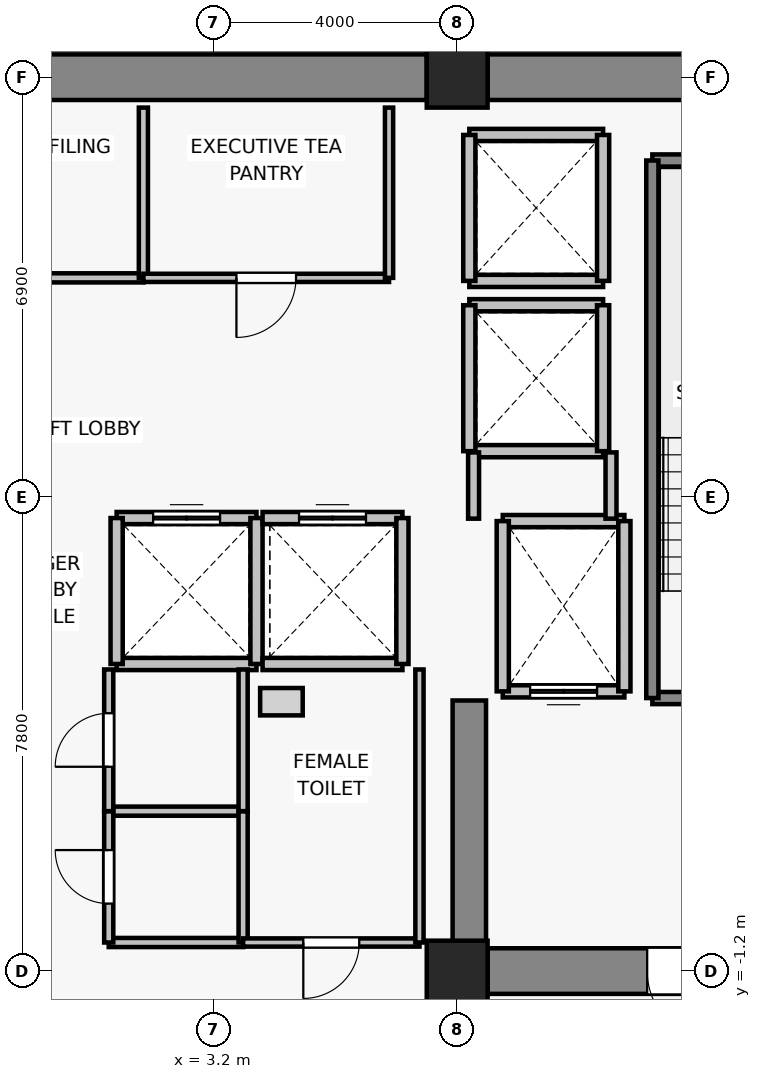
"""IFC4 building model, lengths in metres.
Left out: names, types, materials, properties, quantities, classifications, styles, units other than length and angle.
Written with IfcOpenShell. Run it as: python <this file> out.ifc"""

import sys

from ifc_helpers import new_model, si_unit, direction, frame, frame_2d, origin, origin_2d, place, context, subcontext, project, spatial, rectangle, extrude, source, transform, mapped, element, fill, save


model = new_model("IFC4")
c1 = context("Model", 3, precision=1e-05, world=origin(), true_north=direction((0.0, 1.0)))
c2 = subcontext(c1, "Body", "Model", "MODEL_VIEW")
j1 = project(units=[si_unit("LENGTHUNIT", "METRE"), si_unit("PLANEANGLEUNIT", "RADIAN")], contexts=[c1])
p1 = place(None, origin())
s1 = spatial("IfcSite", under=j1, at=p1, CompositionType="ELEMENT")
p2 = place(p1, origin())
s2 = spatial("IfcBuilding", under=s1, at=p2, CompositionType="ELEMENT")
p3 = place(p2, frame((0.0, 0.0, 179.2)))
s3 = spatial("IfcBuildingStorey", under=s2, at=p3, CompositionType="ELEMENT", Elevation=179.2)
for number, where, z_axis, x_axis in (
    (1, (7.2, -1.2, 0.0), (0.0, 0.0, 1.0), (1.0, 0.0, 0.0)),
    (2, (7.2, 13.5, 0.0), (0.0, 0.0, 1.0), (1.0, 0.0, 0.0)),
):
    element("IfcColumn", number, at=place(p3, frame(where, z_axis=z_axis, x_axis=x_axis)), inside=s3, PredefinedType="COLUMN", context=c2, shape_type="SweptSolid", body=[
        extrude(rectangle(XDim=1.0, YDim=1.0, at=origin_2d()), origin(), (0.0, 0.0, 1.0), 3.3),
    ])
p4 = place(p3, frame((-6.7, 13.5, 0.0), z_axis=(0.0, 0.0, 1.0), x_axis=(1.0, 0.0, 0.0)))
e3 = element("IfcWall", 3, at=p4, inside=s3, PredefinedType="SHEAR", context=c2, shape_type="SweptSolid", body=[
    extrude(rectangle(XDim=13.4, YDim=0.75, at=frame_2d((6.7, 0.0))), origin(), (0.0, 0.0, 1.0), 3.075),
])
p5 = place(p3, frame((7.7, 13.5, 0.0), z_axis=(0.0, 0.0, 1.0), x_axis=(1.0, 0.0, 0.0)))
e4 = element("IfcWall", 4, at=p5, inside=s3, PredefinedType="SHEAR", context=c2, shape_type="SweptSolid", body=[
    extrude(rectangle(XDim=6.2, YDim=0.75, at=frame_2d((3.1, 0.0))), origin(), (0.0, 0.0, 1.0), 3.075),
])
p6 = place(p3, frame((13.9, -1.2, 0.0), z_axis=(0.0, 0.0, 1.0), x_axis=(-1.0, 0.0, 0.0)))
e5 = element("IfcWall", 5, at=p6, inside=s3, PredefinedType="SHEAR", context=c2, shape_type="SweptSolid", body=[
    extrude(rectangle(XDim=6.2, YDim=0.75, at=frame_2d((3.1, 0.0))), origin(), (0.0, 0.0, 1.0), 3.075),
])
p7 = place(p6, frame((2.425, 0.0, 0.0)))
e6 = element("IfcOpeningElement", 6, at=p7, cuts=e5, PredefinedType="OPENING", context=c2, shape_type="SweptSolid", body=[
    extrude(rectangle(XDim=1.15, YDim=2.15, at=frame_2d((0.575, 1.075))), frame((0.0, 0.385, 0.0), z_axis=(0.0, -1.0, 0.0), x_axis=(1.0, 0.0, 0.0)), (0.0, 0.0, 1.0), 0.77),
])
p8 = place(p3, frame((7.4, -0.825, 0.0), z_axis=(0.0, 0.0, 1.0), x_axis=(0.0, 1.0, 0.0)))
e7 = element("IfcWall", 7, at=p8, inside=s3, PredefinedType="SHEAR", context=c2, shape_type="SweptSolid", body=[
    extrude(rectangle(XDim=4.075, YDim=0.55, at=frame_2d((2.038, 0.0))), origin(), (0.0, 0.0, 1.0), 3.075),
])
p9 = place(p3, frame((9.95, 3.4, 0.0), z_axis=(0.0, 0.0, 1.0), x_axis=(-1.0, 0.0, 0.0)))
e8 = element("IfcWall", 8, at=p9, inside=s3, PredefinedType="SOLIDWALL", context=c2, shape_type="SweptSolid", body=[
    extrude(rectangle(XDim=2.0, YDim=0.2, at=frame_2d((1.0, 0.0))), origin(), (0.0, 0.0, 1.0), 3.075),
])
p10 = place(p9, frame((0.45, 0.0, 0.0)))
e9 = element("IfcOpeningElement", 9, at=p10, cuts=e8, PredefinedType="OPENING", context=c2, shape_type="SweptSolid", body=[
    extrude(rectangle(XDim=1.1, YDim=2.2, at=frame_2d((0.55, 1.1))), frame((0.0, 0.11, 0.0), z_axis=(0.0, -1.0, 0.0), x_axis=(1.0, 0.0, 0.0)), (0.0, 0.0, 1.0), 0.22),
])
p11 = place(p3, frame((7.95, 6.2, 0.0), z_axis=(0.0, 0.0, 1.0), x_axis=(1.0, 0.0, 0.0)))
e10 = element("IfcWall", 10, at=p11, inside=s3, PredefinedType="SOLIDWALL", context=c2, shape_type="SweptSolid", body=[
    extrude(rectangle(XDim=2.0, YDim=0.2, at=frame_2d((1.0, 0.0))), origin(), (0.0, 0.0, 1.0), 3.075),
])
for number, where, z_axis, x_axis in (
    (11, (7.95, 3.4, 0.0), (0.0, 0.0, 1.0), (0.0, 1.0, 0.0)),
    (12, (9.95, 6.2, 0.0), (0.0, 0.0, 1.0), (0.0, -1.0, 0.0)),
):
    element("IfcWall", number, at=place(p3, frame(where, z_axis=z_axis, x_axis=x_axis)), inside=s3, PredefinedType="SOLIDWALL", context=c2, shape_type="SweptSolid", body=[
        extrude(rectangle(XDim=2.8, YDim=0.2, at=frame_2d((1.4, 0.0))), origin(), (0.0, 0.0, 1.0), 3.075),
    ])
p12 = place(p3, frame((3.9, 3.85, 0.0), z_axis=(0.0, 0.0, 1.0), x_axis=(-1.0, 0.0, 0.0)))
e13 = element("IfcWall", 13, at=p12, inside=s3, PredefinedType="SOLIDWALL", context=c2, shape_type="SweptSolid", body=[
    extrude(rectangle(XDim=2.3, YDim=0.2, at=frame_2d((1.15, 0.0))), origin(), (0.0, 0.0, 1.0), 3.075),
])
p13 = place(p3, frame((1.6, 6.25, 0.0), z_axis=(0.0, 0.0, 1.0), x_axis=(1.0, 0.0, 0.0)))
e14 = element("IfcWall", 14, at=p13, inside=s3, PredefinedType="SOLIDWALL", context=c2, shape_type="SweptSolid", body=[
    extrude(rectangle(XDim=2.3, YDim=0.2, at=frame_2d((1.15, 0.0))), origin(), (0.0, 0.0, 1.0), 3.075),
])
p14 = place(p13, frame((0.6, 0.0, 0.0)))
e15 = element("IfcOpeningElement", 15, at=p14, cuts=e14, PredefinedType="OPENING", context=c2, shape_type="SweptSolid", body=[
    extrude(rectangle(XDim=1.1, YDim=2.2, at=frame_2d((0.55, 1.1))), frame((0.0, 0.11, 0.0), z_axis=(0.0, -1.0, 0.0), x_axis=(1.0, 0.0, 0.0)), (0.0, 0.0, 1.0), 0.22),
])
for number, where, z_axis, x_axis in (
    (16, (1.6, 3.85, 0.0), (0.0, 0.0, 1.0), (0.0, 1.0, 0.0)),
    (17, (3.9, 6.25, 0.0), (0.0, 0.0, 1.0), (0.0, -1.0, 0.0)),
):
    element("IfcWall", number, at=place(p3, frame(where, z_axis=z_axis, x_axis=x_axis)), inside=s3, PredefinedType="SOLIDWALL", context=c2, shape_type="SweptSolid", body=[
        extrude(rectangle(XDim=2.4, YDim=0.2, at=frame_2d((1.2, 0.0))), origin(), (0.0, 0.0, 1.0), 3.075),
    ])
p15 = place(p3, frame((6.3, 3.85, 0.0), z_axis=(0.0, 0.0, 1.0), x_axis=(-1.0, 0.0, 0.0)))
e18 = element("IfcWall", 18, at=p15, inside=s3, PredefinedType="SOLIDWALL", context=c2, shape_type="SweptSolid", body=[
    extrude(rectangle(XDim=2.3, YDim=0.2, at=frame_2d((1.15, 0.0))), origin(), (0.0, 0.0, 1.0), 3.075),
])
p16 = place(p3, frame((4.0, 6.25, 0.0), z_axis=(0.0, 0.0, 1.0), x_axis=(1.0, 0.0, 0.0)))
e19 = element("IfcWall", 19, at=p16, inside=s3, PredefinedType="SOLIDWALL", context=c2, shape_type="SweptSolid", body=[
    extrude(rectangle(XDim=2.3, YDim=0.2, at=frame_2d((1.15, 0.0))), origin(), (0.0, 0.0, 1.0), 3.075),
])
p17 = place(p16, frame((0.6, 0.0, 0.0)))
e20 = element("IfcOpeningElement", 20, at=p17, cuts=e19, PredefinedType="OPENING", context=c2, shape_type="SweptSolid", body=[
    extrude(rectangle(XDim=1.1, YDim=2.2, at=frame_2d((0.55, 1.1))), frame((0.0, 0.11, 0.0), z_axis=(0.0, -1.0, 0.0), x_axis=(1.0, 0.0, 0.0)), (0.0, 0.0, 1.0), 0.22),
])
p18 = place(p3, frame((6.3, 6.25, 0.0), z_axis=(0.0, 0.0, 1.0), x_axis=(0.0, -1.0, 0.0)))
e21 = element("IfcWall", 21, at=p18, inside=s3, PredefinedType="SOLIDWALL", context=c2, shape_type="SweptSolid", body=[
    extrude(rectangle(XDim=2.4, YDim=0.2, at=frame_2d((1.2, 0.0))), origin(), (0.0, 0.0, 1.0), 3.075),
])
for number, where, z_axis, x_axis in (
    (22, (9.6, 7.35, 0.0), (0.0, 0.0, 1.0), (-1.0, 0.0, 0.0)),
    (23, (7.4, 9.75, 0.0), (0.0, 0.0, 1.0), (1.0, 0.0, 0.0)),
):
    element("IfcWall", number, at=place(p3, frame(where, z_axis=z_axis, x_axis=x_axis)), inside=s3, PredefinedType="SOLIDWALL", context=c2, shape_type="SweptSolid", body=[
        extrude(rectangle(XDim=2.2, YDim=0.2, at=frame_2d((1.1, 0.0))), origin(), (0.0, 0.0, 1.0), 2.565),
    ])
p19 = place(p3, frame((7.4, 7.35, 0.0), z_axis=(0.0, 0.0, 1.0), x_axis=(0.0, 1.0, 0.0)))
e24 = element("IfcWall", 24, at=p19, inside=s3, PredefinedType="SOLIDWALL", context=c2, shape_type="SweptSolid", body=[
    extrude(rectangle(XDim=2.4, YDim=0.2, at=frame_2d((1.2, 0.0))), origin(), (0.0, 0.0, 1.0), 2.565),
])
p20 = place(p3, frame((9.6, 9.75, 0.0), z_axis=(0.0, 0.0, 1.0), x_axis=(0.0, -1.0, 0.0)))
e25 = element("IfcWall", 25, at=p20, inside=s3, PredefinedType="SOLIDWALL", context=c2, shape_type="SweptSolid", body=[
    extrude(rectangle(XDim=2.4, YDim=0.2, at=frame_2d((1.2, 0.0))), origin(), (0.0, 0.0, 1.0), 3.075),
])
for number, where, z_axis, x_axis in (
    (26, (9.6, 10.15, 0.0), (0.0, 0.0, 1.0), (-1.0, 0.0, 0.0)),
    (27, (7.4, 12.55, 0.0), (0.0, 0.0, 1.0), (1.0, 0.0, 0.0)),
):
    element("IfcWall", number, at=place(p3, frame(where, z_axis=z_axis, x_axis=x_axis)), inside=s3, PredefinedType="SOLIDWALL", context=c2, shape_type="SweptSolid", body=[
        extrude(rectangle(XDim=2.2, YDim=0.2, at=frame_2d((1.1, 0.0))), origin(), (0.0, 0.0, 1.0), 2.565),
    ])
p21 = place(p3, frame((7.4, 10.15, 0.0), z_axis=(0.0, 0.0, 1.0), x_axis=(0.0, 1.0, 0.0)))
e28 = element("IfcWall", 28, at=p21, inside=s3, PredefinedType="SOLIDWALL", context=c2, shape_type="SweptSolid", body=[
    extrude(rectangle(XDim=2.4, YDim=0.2, at=frame_2d((1.2, 0.0))), origin(), (0.0, 0.0, 1.0), 2.565),
])
p22 = place(p3, frame((9.6, 12.55, 0.0), z_axis=(0.0, 0.0, 1.0), x_axis=(0.0, -1.0, 0.0)))
e29 = element("IfcWall", 29, at=p22, inside=s3, PredefinedType="SOLIDWALL", context=c2, shape_type="SweptSolid", body=[
    extrude(rectangle(XDim=2.4, YDim=0.2, at=frame_2d((1.2, 0.0))), origin(), (0.0, 0.0, 1.0), 3.075),
])
p23 = place(p3, frame((13.93, 3.29, 0.0), z_axis=(0.0, 0.0, 1.0), x_axis=(-1.0, 0.0, 0.0)))
e30 = element("IfcWall", 30, at=p23, inside=s3, PredefinedType="SOLIDWALL", context=c2, shape_type="SweptSolid", body=[
    extrude(rectangle(XDim=3.52, YDim=0.2, at=frame_2d((1.76, 0.0))), origin(), (0.0, 0.0, 1.0), 3.075),
])
p24 = place(p23, frame((1.205, 0.0, 0.0)))
e31 = element("IfcOpeningElement", 31, at=p24, cuts=e30, PredefinedType="OPENING", context=c2, shape_type="SweptSolid", body=[
    extrude(rectangle(XDim=1.15, YDim=2.15, at=frame_2d((0.575, 1.075))), frame((0.0, 0.11, 0.0), z_axis=(0.0, -1.0, 0.0), x_axis=(1.0, 0.0, 0.0)), (0.0, 0.0, 1.0), 0.22),
])
p25 = place(p3, frame((10.41, 12.13, 0.0), z_axis=(0.0, 0.0, 1.0), x_axis=(1.0, 0.0, 0.0)))
e32 = element("IfcWall", 32, at=p25, inside=s3, PredefinedType="SOLIDWALL", context=c2, shape_type="SweptSolid", body=[
    extrude(rectangle(XDim=3.52, YDim=0.2, at=frame_2d((1.76, 0.0))), origin(), (0.0, 0.0, 1.0), 3.075),
])
p26 = place(p3, frame((10.41, 3.29, 0.0), z_axis=(0.0, 0.0, 1.0), x_axis=(0.0, 1.0, 0.0)))
e33 = element("IfcWall", 33, at=p26, inside=s3, PredefinedType="SOLIDWALL", context=c2, shape_type="SweptSolid", body=[
    extrude(rectangle(XDim=8.84, YDim=0.2, at=frame_2d((4.42, 0.0))), origin(), (0.0, 0.0, 1.0), 3.075),
])
p27 = place(p3, frame((7.47, 6.24, 0.0), z_axis=(0.0, 0.0, 1.0), x_axis=(0.0, 1.0, 0.0)))
e34 = element("IfcWall", 34, at=p27, inside=s3, PredefinedType="PARTITIONING", context=c2, shape_type="SweptSolid", body=[
    extrude(rectangle(XDim=1.09, YDim=0.18, at=frame_2d((0.545, 0.0))), origin(), (0.0, 0.0, 1.0), 2.565),
])
p28 = place(p3, frame((9.73, 7.33, 0.0), z_axis=(0.0, 0.0, 1.0), x_axis=(0.0, -1.0, 0.0)))
e35 = element("IfcWall", 35, at=p28, inside=s3, PredefinedType="PARTITIONING", context=c2, shape_type="SweptSolid", body=[
    extrude(rectangle(XDim=1.09, YDim=0.18, at=frame_2d((0.545, 0.0))), origin(), (0.0, 0.0, 1.0), 3.075),
])
p29 = place(p3, frame((2.04, 10.2, 0.0), z_axis=(0.0, 0.0, 1.0), x_axis=(-1.0, 0.0, 0.0)))
e36 = element("IfcWall", 36, at=p29, inside=s3, PredefinedType="PARTITIONING", context=c2, shape_type="SweptSolid", body=[
    extrude(rectangle(XDim=4.16, YDim=0.15, at=frame_2d((2.08, 0.0))), origin(), (0.0, 0.0, 1.0), 3.075),
])
p30 = place(p29, frame((1.55, 0.0, 0.0)))
e37 = element("IfcOpeningElement", 37, at=p30, cuts=e36, PredefinedType="OPENING", context=c2, shape_type="SweptSolid", body=[
    extrude(rectangle(XDim=0.98, YDim=2.15, at=frame_2d((0.49, 1.075))), frame((0.0, 0.085, 0.0), z_axis=(0.0, -1.0, 0.0), x_axis=(1.0, 0.0, 0.0)), (0.0, 0.0, 1.0), 0.17),
])
p31 = place(p3, frame((2.04, 13.0, 0.0), z_axis=(0.0, 0.0, 1.0), x_axis=(0.0, -1.0, 0.0)))
e38 = element("IfcWall", 38, at=p31, inside=s3, PredefinedType="PARTITIONING", context=c2, shape_type="SweptSolid", body=[
    extrude(rectangle(XDim=2.8, YDim=0.15, at=frame_2d((1.4, 0.0))), origin(), (0.0, 0.0, 1.0), 3.075),
])
p32 = place(p3, frame((6.08, 10.2, 0.0), z_axis=(0.0, 0.0, 1.0), x_axis=(-1.0, 0.0, 0.0)))
e39 = element("IfcWall", 39, at=p32, inside=s3, PredefinedType="PARTITIONING", context=c2, shape_type="SweptSolid", body=[
    extrude(rectangle(XDim=4.04, YDim=0.135, at=frame_2d((2.02, 0.0))), origin(), (0.0, 0.0, 1.0), 3.075),
])
p33 = place(p32, frame((1.53, 0.0, 0.0)))
e40 = element("IfcOpeningElement", 40, at=p33, cuts=e39, PredefinedType="OPENING", context=c2, shape_type="SweptSolid", body=[
    extrude(rectangle(XDim=0.98, YDim=2.15, at=frame_2d((0.49, 1.075))), frame((0.0, 0.077, 0.0), z_axis=(0.0, -1.0, 0.0), x_axis=(1.0, 0.0, 0.0)), (0.0, 0.0, 1.0), 0.155),
])
p34 = place(p3, frame((6.08, 13.0, 0.0), z_axis=(0.0, 0.0, 1.0), x_axis=(0.0, -1.0, 0.0)))
e41 = element("IfcWall", 41, at=p34, inside=s3, PredefinedType="PARTITIONING", context=c2, shape_type="SweptSolid", body=[
    extrude(rectangle(XDim=2.8, YDim=0.135, at=frame_2d((1.4, 0.0))), origin(), (0.0, 0.0, 1.0), 3.075),
])
for number, where, z_axis, x_axis in (
    (42, (3.68, -0.73, 0.0), (0.0, 0.0, 1.0), (-1.0, 0.0, 0.0)),
    (43, (1.47, 1.43, 0.0), (0.0, 0.0, 1.0), (1.0, 0.0, 0.0)),
):
    element("IfcWall", number, at=place(p3, frame(where, z_axis=z_axis, x_axis=x_axis)), inside=s3, PredefinedType="PARTITIONING", context=c2, shape_type="SweptSolid", body=[
        extrude(rectangle(XDim=2.21, YDim=0.15, at=frame_2d((1.105, 0.0))), origin(), (0.0, 0.0, 1.0), 3.075),
    ])
p35 = place(p3, frame((1.47, -0.73, 0.0), z_axis=(0.0, 0.0, 1.0), x_axis=(0.0, 1.0, 0.0)))
e44 = element("IfcWall", 44, at=p35, inside=s3, PredefinedType="PARTITIONING", context=c2, shape_type="SweptSolid", body=[
    extrude(rectangle(XDim=2.16, YDim=0.15, at=frame_2d((1.08, 0.0))), origin(), (0.0, 0.0, 1.0), 3.075),
])
p36 = place(p35, frame((0.64, 0.0, 0.0)))
e45 = element("IfcOpeningElement", 45, at=p36, cuts=e44, PredefinedType="OPENING", context=c2, shape_type="SweptSolid", body=[
    extrude(rectangle(XDim=0.88, YDim=2.1, at=frame_2d((0.44, 1.05))), frame((0.0, 0.085, 0.0), z_axis=(0.0, -1.0, 0.0), x_axis=(1.0, 0.0, 0.0)), (0.0, 0.0, 1.0), 0.17),
])
p37 = place(p3, frame((3.68, 1.43, 0.0), z_axis=(0.0, 0.0, 1.0), x_axis=(0.0, -1.0, 0.0)))
e46 = element("IfcWall", 46, at=p37, inside=s3, PredefinedType="PARTITIONING", context=c2, shape_type="SweptSolid", body=[
    extrude(rectangle(XDim=2.16, YDim=0.15, at=frame_2d((1.08, 0.0))), origin(), (0.0, 0.0, 1.0), 3.075),
])
p38 = place(p3, frame((1.47, 1.43, 0.0), z_axis=(0.0, 0.0, 1.0), x_axis=(0.0, 1.0, 0.0)))
e47 = element("IfcWall", 47, at=p38, inside=s3, PredefinedType="PARTITIONING", context=c2, shape_type="SweptSolid", body=[
    extrude(rectangle(XDim=2.33, YDim=0.15, at=frame_2d((1.165, 0.0))), origin(), (0.0, 0.0, 1.0), 3.075),
])
p39 = place(p38, frame((0.73, 0.0, 0.0)))
e48 = element("IfcOpeningElement", 48, at=p39, cuts=e47, PredefinedType="OPENING", context=c2, shape_type="SweptSolid", body=[
    extrude(rectangle(XDim=0.88, YDim=2.15, at=frame_2d((0.44, 1.075))), frame((0.0, 0.085, 0.0), z_axis=(0.0, -1.0, 0.0), x_axis=(1.0, 0.0, 0.0)), (0.0, 0.0, 1.0), 0.17),
])
p40 = place(p3, frame((3.68, 3.76, 0.0), z_axis=(0.0, 0.0, 1.0), x_axis=(0.0, -1.0, 0.0)))
e49 = element("IfcWall", 49, at=p40, inside=s3, PredefinedType="PARTITIONING", context=c2, shape_type="SweptSolid", body=[
    extrude(rectangle(XDim=2.33, YDim=0.15, at=frame_2d((1.165, 0.0))), origin(), (0.0, 0.0, 1.0), 3.075),
])
p41 = place(p3, frame((6.58, -0.73, 0.0), z_axis=(0.0, 0.0, 1.0), x_axis=(-1.0, 0.0, 0.0)))
e50 = element("IfcWall", 50, at=p41, inside=s3, PredefinedType="PARTITIONING", context=c2, shape_type="SweptSolid", body=[
    extrude(rectangle(XDim=2.9, YDim=0.135, at=frame_2d((1.45, 0.0))), origin(), (0.0, 0.0, 1.0), 3.075),
])
p42 = place(p41, frame((0.99, 0.0, 0.0)))
e51 = element("IfcOpeningElement", 51, at=p42, cuts=e50, PredefinedType="OPENING", context=c2, shape_type="SweptSolid", body=[
    extrude(rectangle(XDim=0.92, YDim=2.1, at=frame_2d((0.46, 1.05))), frame((0.0, 0.077, 0.0), z_axis=(0.0, -1.0, 0.0), x_axis=(1.0, 0.0, 0.0)), (0.0, 0.0, 1.0), 0.155),
])
p43 = place(p3, frame((6.58, 3.76, 0.0), z_axis=(0.0, 0.0, 1.0), x_axis=(0.0, -1.0, 0.0)))
e52 = element("IfcWall", 52, at=p43, inside=s3, PredefinedType="PARTITIONING", context=c2, shape_type="SweptSolid", body=[
    extrude(rectangle(XDim=4.49, YDim=0.135, at=frame_2d((2.245, 0.0))), origin(), (0.0, 0.0, 1.0), 3.075),
])
m1 = source(origin(), c2, "Body", "SweptSolid", [
    extrude(rectangle(XDim=1.1, YDim=2.2, at=frame_2d((0.55, 1.1))), frame((0.0, 0.025, 0.0), z_axis=(0.0, -1.0, 0.0), x_axis=(1.0, 0.0, 0.0)), (0.0, 0.0, 1.0), 0.05),
])
p44 = place(p10, origin())
e53 = element("IfcDoor", 53, at=p44, inside=s3, OperationType="DOUBLE_DOOR_SLIDING", PredefinedType="DOOR", context=c2, shape_type="MappedRepresentation", body=[
    mapped(m1, transform((0.0, 0.0, 0.0), x_axis=(1.0, 0.0, 0.0), y_axis=(0.0, 1.0, 0.0), z_axis=(0.0, 0.0, 1.0), scale=1.0)),
])
fill(e9, e53)
p45 = place(p14, origin())
e54 = element("IfcDoor", 54, at=p45, inside=s3, OperationType="DOUBLE_DOOR_SLIDING", PredefinedType="DOOR", context=c2, shape_type="MappedRepresentation", body=[
    mapped(m1, transform((0.0, 0.0, 0.0), x_axis=(1.0, 0.0, 0.0), y_axis=(0.0, 1.0, 0.0), z_axis=(0.0, 0.0, 1.0), scale=1.0)),
])
fill(e15, e54)
p46 = place(p17, origin())
e55 = element("IfcDoor", 55, at=p46, inside=s3, OperationType="DOUBLE_DOOR_SLIDING", PredefinedType="DOOR", context=c2, shape_type="MappedRepresentation", body=[
    mapped(m1, transform((0.0, 0.0, 0.0), x_axis=(1.0, 0.0, 0.0), y_axis=(0.0, 1.0, 0.0), z_axis=(0.0, 0.0, 1.0), scale=1.0)),
])
fill(e20, e55)
m2 = source(origin(), c2, "Body", "SweptSolid", [
    extrude(rectangle(XDim=1.15, YDim=2.15, at=frame_2d((0.575, 1.075))), frame((0.0, 0.025, 0.0), z_axis=(0.0, -1.0, 0.0), x_axis=(1.0, 0.0, 0.0)), (0.0, 0.0, 1.0), 0.05),
])
p47 = place(p7, origin())
e56 = element("IfcDoor", 56, at=p47, inside=s3, OperationType="SINGLE_SWING_LEFT", PredefinedType="DOOR", context=c2, shape_type="MappedRepresentation", body=[
    mapped(m2, transform((0.0, 0.0, 0.0), x_axis=(1.0, 0.0, 0.0), y_axis=(0.0, 1.0, 0.0), z_axis=(0.0, 0.0, 1.0), scale=1.0)),
])
fill(e6, e56)
m3 = source(origin(), c2, "Body", "SweptSolid", [
    extrude(rectangle(XDim=0.98, YDim=2.15, at=frame_2d((0.49, 1.075))), frame((0.0, 0.025, 0.0), z_axis=(0.0, -1.0, 0.0), x_axis=(1.0, 0.0, 0.0)), (0.0, 0.0, 1.0), 0.05),
])
p48 = place(p33, origin())
e57 = element("IfcDoor", 57, at=p48, inside=s3, OperationType="SINGLE_SWING_RIGHT", PredefinedType="DOOR", context=c2, shape_type="MappedRepresentation", body=[
    mapped(m3, transform((0.0, 0.0, 0.0), x_axis=(1.0, 0.0, 0.0), y_axis=(0.0, 1.0, 0.0), z_axis=(0.0, 0.0, 1.0), scale=1.0)),
])
fill(e40, e57)
m4 = source(origin(), c2, "Body", "SweptSolid", [
    extrude(rectangle(XDim=0.88, YDim=2.1, at=frame_2d((0.44, 1.05))), frame((0.0, 0.025, 0.0), z_axis=(0.0, -1.0, 0.0), x_axis=(1.0, 0.0, 0.0)), (0.0, 0.0, 1.0), 0.05),
])
p49 = place(p36, origin())
e58 = element("IfcDoor", 58, at=p49, inside=s3, OperationType="SINGLE_SWING_RIGHT", PredefinedType="DOOR", context=c2, shape_type="MappedRepresentation", body=[
    mapped(m4, transform((0.0, 0.0, 0.0), x_axis=(1.0, 0.0, 0.0), y_axis=(0.0, 1.0, 0.0), z_axis=(0.0, 0.0, 1.0), scale=1.0)),
])
fill(e45, e58)
m5 = source(origin(), c2, "Body", "SweptSolid", [
    extrude(rectangle(XDim=0.88, YDim=2.15, at=frame_2d((0.44, 1.075))), frame((0.0, 0.025, 0.0), z_axis=(0.0, -1.0, 0.0), x_axis=(1.0, 0.0, 0.0)), (0.0, 0.0, 1.0), 0.05),
])
p50 = place(p39, origin())
e59 = element("IfcDoor", 59, at=p50, inside=s3, OperationType="SINGLE_SWING_LEFT", PredefinedType="DOOR", context=c2, shape_type="MappedRepresentation", body=[
    mapped(m5, transform((0.0, 0.0, 0.0), x_axis=(1.0, 0.0, 0.0), y_axis=(0.0, 1.0, 0.0), z_axis=(0.0, 0.0, 1.0), scale=1.0)),
])
fill(e48, e59)
m6 = source(origin(), c2, "Body", "SweptSolid", [
    extrude(rectangle(XDim=0.92, YDim=2.1, at=frame_2d((0.46, 1.05))), frame((0.0, 0.025, 0.0), z_axis=(0.0, -1.0, 0.0), x_axis=(1.0, 0.0, 0.0)), (0.0, 0.0, 1.0), 0.05),
])
p51 = place(p42, origin())
e60 = element("IfcDoor", 60, at=p51, inside=s3, OperationType="SINGLE_SWING_RIGHT", PredefinedType="DOOR", context=c2, shape_type="MappedRepresentation", body=[
    mapped(m6, transform((0.0, 0.0, 0.0), x_axis=(1.0, 0.0, 0.0), y_axis=(0.0, 1.0, 0.0), z_axis=(0.0, 0.0, 1.0), scale=1.0)),
])
fill(e51, e60)
save(model, sys.argv[1])
